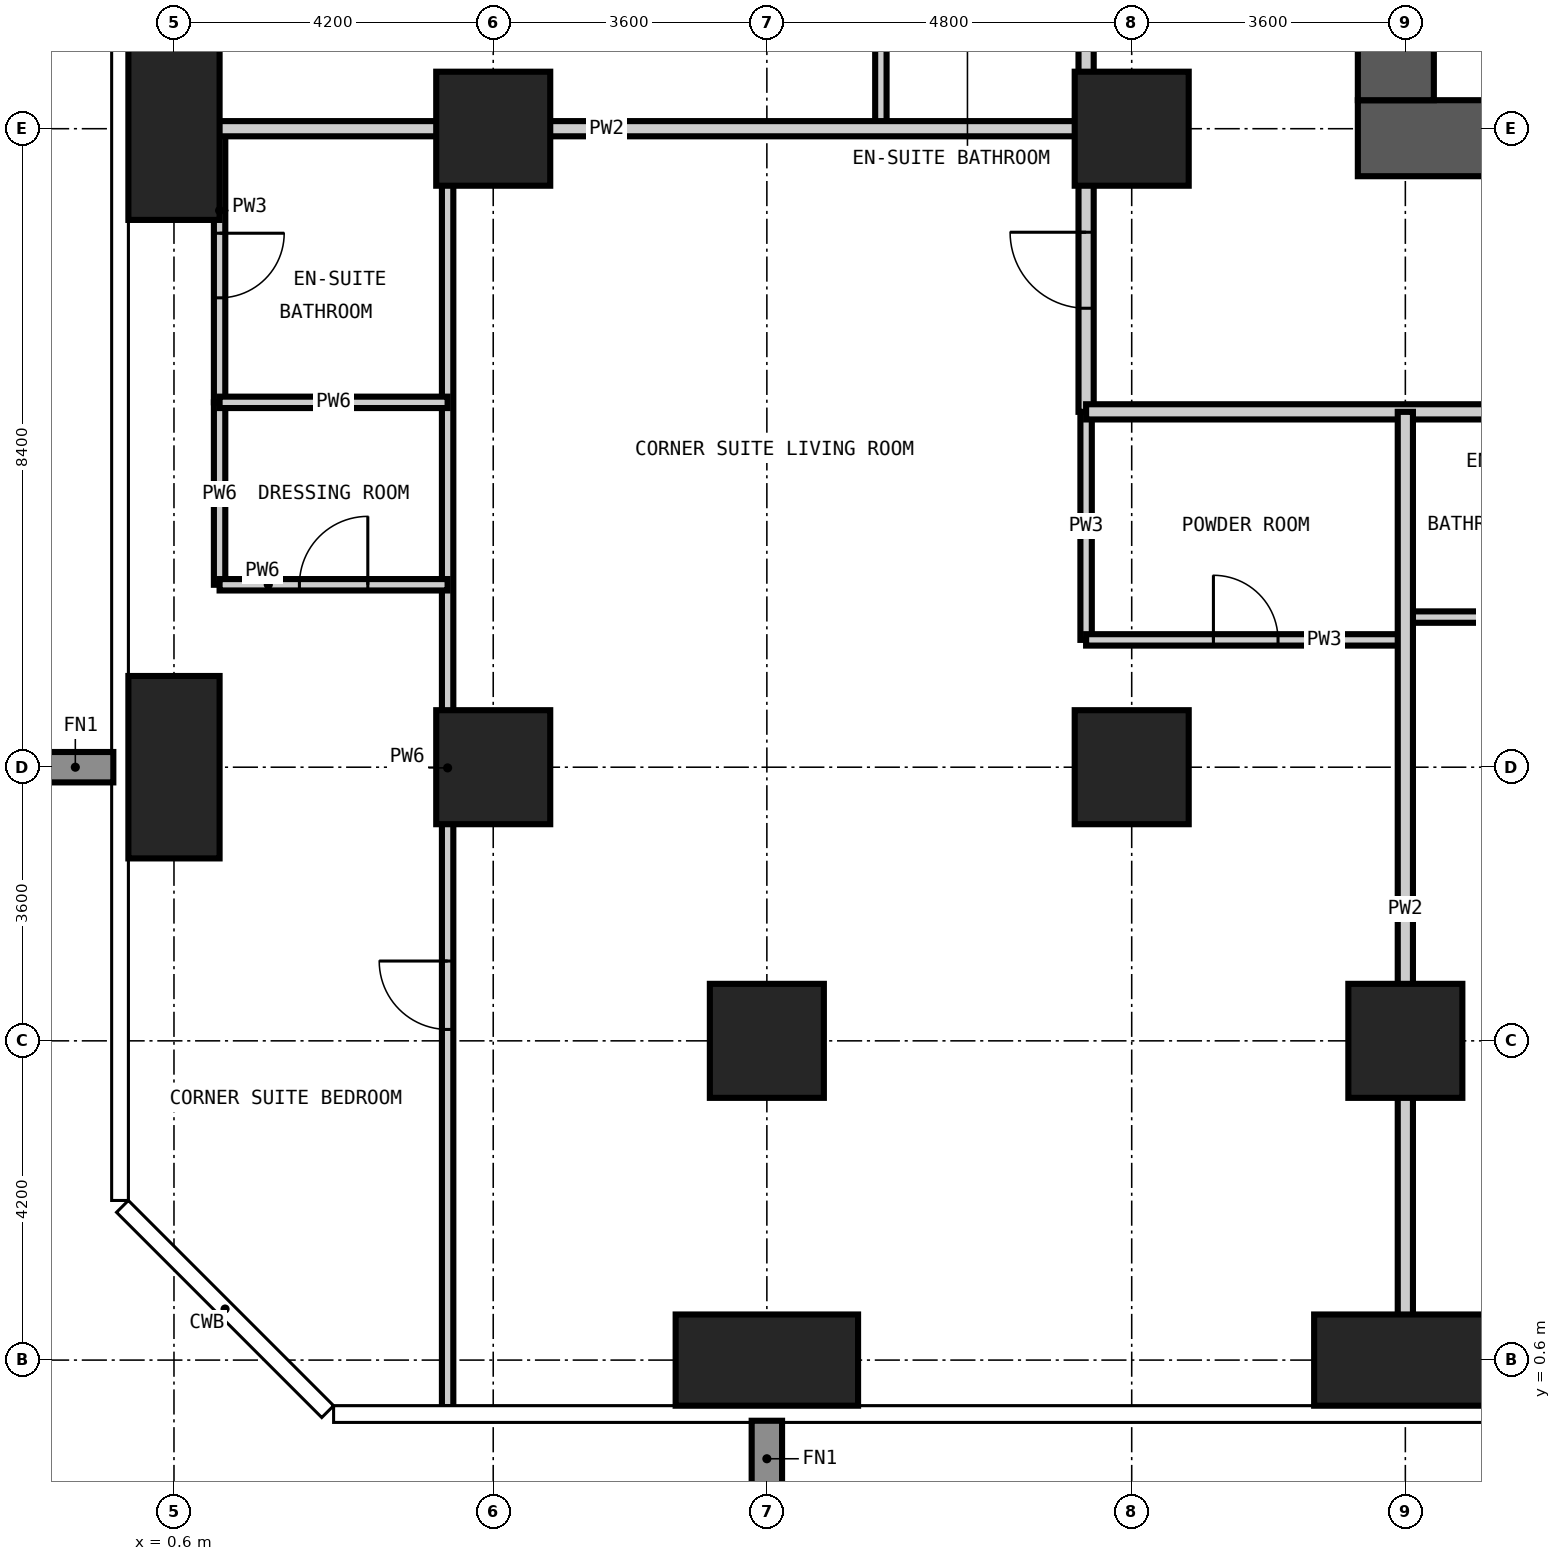
"""IFC4 building model, lengths in metres.
Left out: names, types, materials, properties, quantities, classifications, styles, units other than length and angle.
Written with IfcOpenShell. Run it as: python <this file> out.ifc"""

import sys

from ifc_helpers import new_model, si_unit, direction, frame, frame_2d, origin, origin_2d, place, context, subcontext, project, spatial, rectangle, extrude, element, fill, save


model = new_model("IFC4")
c1 = context("Model", 3, precision=1e-05, world=origin(), true_north=direction((0.0, 1.0)))
c2 = subcontext(c1, "Body", "Model", "MODEL_VIEW")
j1 = project(units=[si_unit("LENGTHUNIT", "METRE"), si_unit("PLANEANGLEUNIT", "RADIAN")], contexts=[c1])
p1 = place(None, origin())
s1 = spatial("IfcSite", under=j1, at=p1, CompositionType="ELEMENT")
p2 = place(p1, origin())
s2 = spatial("IfcBuilding", under=s1, at=p2, CompositionType="ELEMENT")
p3 = place(p2, frame((0.0, 0.0, 118.8)))
s3 = spatial("IfcBuildingStorey", under=s2, at=p3, CompositionType="ELEMENT", Elevation=118.8)
for number, where, z_axis, x_axis in (
    (1, (0.6, 8.4, -0.35), (0.0, 0.0, 1.0), (1.0, 0.0, 0.0)),
    (2, (0.6, 16.8, -0.35), (0.0, 0.0, 1.0), (1.0, 0.0, 0.0)),
):
    element("IfcColumn", number, at=place(p3, frame(where, z_axis=z_axis, x_axis=x_axis)), inside=s3, PredefinedType="COLUMN", context=c2, shape_type="SweptSolid", body=[
        extrude(rectangle(XDim=1.2, YDim=2.4, at=origin_2d()), origin(), (0.0, 0.0, 1.0), 3.6),
    ])
for number, where, z_axis, x_axis in (
    (3, (4.8, 8.4, -0.35), (0.0, 0.0, 1.0), (1.0, 0.0, 0.0)),
    (4, (4.8, 16.8, -0.35), (0.0, 0.0, 1.0), (1.0, 0.0, 0.0)),
):
    element("IfcColumn", number, at=place(p3, frame(where, z_axis=z_axis, x_axis=x_axis)), inside=s3, PredefinedType="COLUMN", context=c2, shape_type="SweptSolid", body=[
        extrude(rectangle(XDim=1.5, YDim=1.5, at=origin_2d()), origin(), (0.0, 0.0, 1.0), 3.6),
    ])
p4 = place(p3, frame((8.4, 0.6, -0.35), z_axis=(0.0, 0.0, 1.0), x_axis=(1.0, 0.0, 0.0)))
e5 = element("IfcColumn", 5, at=p4, inside=s3, PredefinedType="COLUMN", context=c2, shape_type="SweptSolid", body=[
    extrude(rectangle(XDim=2.4, YDim=1.2, at=origin_2d()), origin(), (0.0, 0.0, 1.0), 3.6),
])
for number, where, z_axis, x_axis in (
    (6, (8.4, 4.8, -0.35), (0.0, 0.0, 1.0), (1.0, 0.0, 0.0)),
    (7, (13.2, 8.4, -0.35), (0.0, 0.0, 1.0), (1.0, 0.0, 0.0)),
    (8, (13.2, 16.8, -0.35), (0.0, 0.0, 1.0), (1.0, 0.0, 0.0)),
):
    element("IfcColumn", number, at=place(p3, frame(where, z_axis=z_axis, x_axis=x_axis)), inside=s3, PredefinedType="COLUMN", context=c2, shape_type="SweptSolid", body=[
        extrude(rectangle(XDim=1.5, YDim=1.5, at=origin_2d()), origin(), (0.0, 0.0, 1.0), 3.6),
    ])
p5 = place(p3, frame((16.8, 0.6, -0.35), z_axis=(0.0, 0.0, 1.0), x_axis=(1.0, 0.0, 0.0)))
e9 = element("IfcColumn", 9, at=p5, inside=s3, PredefinedType="COLUMN", context=c2, shape_type="SweptSolid", body=[
    extrude(rectangle(XDim=2.4, YDim=1.2, at=origin_2d()), origin(), (0.0, 0.0, 1.0), 3.6),
])
p6 = place(p3, frame((16.8, 4.8, -0.35), z_axis=(0.0, 0.0, 1.0), x_axis=(1.0, 0.0, 0.0)))
e10 = element("IfcColumn", 10, at=p6, inside=s3, PredefinedType="COLUMN", context=c2, shape_type="SweptSolid", body=[
    extrude(rectangle(XDim=1.5, YDim=1.5, at=origin_2d()), origin(), (0.0, 0.0, 1.0), 3.6),
])
p7 = place(p3, frame((16.175, 16.675, -0.35), z_axis=(0.0, 0.0, 1.0), x_axis=(1.0, 0.0, 0.0)))
e11 = element("IfcWall", 11, at=p7, inside=s3, PredefinedType="SHEAR", context=c2, shape_type="SweptSolid", body=[
    extrude(rectangle(XDim=26.45, YDim=1.0, at=frame_2d((13.225, 0.0))), origin(), (0.0, 0.0, 1.0), 3.6),
])
p8 = place(p7, frame((12.725, 0.0, 0.35)))
e12 = element("IfcOpeningElement", 12, at=p8, cuts=e11, PredefinedType="OPENING", context=c2, shape_type="SweptSolid", body=[
    extrude(rectangle(XDim=1.0, YDim=2.1, at=frame_2d((0.5, 1.05))), frame((0.0, 0.51, 0.0), z_axis=(0.0, -1.0, 0.0), x_axis=(1.0, 0.0, 0.0)), (0.0, 0.0, 1.0), 1.02),
])
p9 = place(p7, frame((19.025, 0.0, 0.35)))
e13 = element("IfcOpeningElement", 13, at=p9, cuts=e11, PredefinedType="OPENING", context=c2, shape_type="SweptSolid", body=[
    extrude(rectangle(XDim=1.0, YDim=2.1, at=frame_2d((0.5, 1.05))), frame((0.0, 0.51, 0.0), z_axis=(0.0, -1.0, 0.0), x_axis=(1.0, 0.0, 0.0)), (0.0, 0.0, 1.0), 1.02),
])
p10 = place(p3, frame((16.675, 41.625, -0.35), z_axis=(0.0, 0.0, 1.0), x_axis=(0.0, -1.0, 0.0)))
e14 = element("IfcWall", 14, at=p10, inside=s3, PredefinedType="SHEAR", context=c2, shape_type="SweptSolid", body=[
    extrude(rectangle(XDim=24.45, YDim=1.0, at=frame_2d((12.225, 0.0))), origin(), (0.0, 0.0, 1.0), 3.6),
])
p11 = place(p10, frame((11.325, 0.0, 0.35)))
e15 = element("IfcOpeningElement", 15, at=p11, cuts=e14, PredefinedType="OPENING", context=c2, shape_type="SweptSolid", body=[
    extrude(rectangle(XDim=1.8, YDim=2.2, at=frame_2d((0.9, 1.1))), frame((0.0, 0.51, 0.0), z_axis=(0.0, -1.0, 0.0), x_axis=(1.0, 0.0, 0.0)), (0.0, 0.0, 1.0), 1.02),
])
p12 = place(p10, frame((20.125, 0.0, 0.35)))
e16 = element("IfcOpeningElement", 16, at=p12, cuts=e14, PredefinedType="OPENING", context=c2, shape_type="SweptSolid", body=[
    extrude(rectangle(XDim=1.0, YDim=2.1, at=frame_2d((0.5, 1.05))), frame((0.0, 0.51, 0.0), z_axis=(0.0, -1.0, 0.0), x_axis=(1.0, 0.0, 0.0)), (0.0, 0.0, 1.0), 1.02),
])
p13 = place(p10, frame((5.425, 0.0, 0.35)))
e17 = element("IfcOpeningElement", 17, at=p13, cuts=e14, PredefinedType="OPENING", context=c2, shape_type="SweptSolid", body=[
    extrude(rectangle(XDim=1.0, YDim=2.1, at=frame_2d((0.5, 1.05))), frame((0.0, 0.51, 0.0), z_axis=(0.0, -1.0, 0.0), x_axis=(1.0, 0.0, 0.0)), (0.0, 0.0, 1.0), 1.02),
])
p14 = place(p3, frame((1.2, 13.2, 0.0), z_axis=(0.0, 0.0, 1.0), x_axis=(0.0, 1.0, 0.0)))
e18 = element("IfcWall", 18, at=p14, inside=s3, PredefinedType="PARTITIONING", context=c2, shape_type="SweptSolid", body=[
    extrude(rectangle(XDim=3.6, YDim=0.15, at=frame_2d((1.8, 0.0))), origin(), (0.0, 0.0, 1.0), 3.25),
])
p15 = place(p14, frame((1.375, 0.0, 0.0)))
e19 = element("IfcOpeningElement", 19, at=p15, cuts=e18, PredefinedType="OPENING", context=c2, shape_type="SweptSolid", body=[
    extrude(rectangle(XDim=0.85, YDim=2.1, at=frame_2d((0.425, 1.05))), frame((0.0, 0.085, 0.0), z_axis=(0.0, -1.0, 0.0), x_axis=(1.0, 0.0, 0.0)), (0.0, 0.0, 1.0), 0.17),
])
p16 = place(p3, frame((9.9, 16.8, 0.0), z_axis=(0.0, 0.0, 1.0), x_axis=(0.0, 1.0, 0.0)))
e20 = element("IfcWall", 20, at=p16, inside=s3, PredefinedType="PARTITIONING", context=c2, shape_type="SweptSolid", body=[
    extrude(rectangle(XDim=2.4, YDim=0.15, at=frame_2d((1.2, 0.0))), origin(), (0.0, 0.0, 1.0), 3.25),
])
p17 = place(p3, frame((12.6, 10.075, 0.0), z_axis=(0.0, 0.0, 1.0), x_axis=(0.0, 1.0, 0.0)))
e21 = element("IfcWall", 21, at=p17, inside=s3, PredefinedType="PARTITIONING", context=c2, shape_type="SweptSolid", body=[
    extrude(rectangle(XDim=3.0, YDim=0.15, at=frame_2d((1.5, 0.0))), origin(), (0.0, 0.0, 1.0), 3.25),
])
p18 = place(p3, frame((12.6, 10.075, 0.0), z_axis=(0.0, 0.0, 1.0), x_axis=(1.0, 0.0, 0.0)))
e22 = element("IfcWall", 22, at=p18, inside=s3, PredefinedType="PARTITIONING", context=c2, shape_type="SweptSolid", body=[
    extrude(rectangle(XDim=4.2, YDim=0.15, at=frame_2d((2.1, 0.0))), origin(), (0.0, 0.0, 1.0), 3.25),
])
p19 = place(p18, frame((1.675, 0.0, 0.0)))
e23 = element("IfcOpeningElement", 23, at=p19, cuts=e22, PredefinedType="OPENING", context=c2, shape_type="SweptSolid", body=[
    extrude(rectangle(XDim=0.85, YDim=2.1, at=frame_2d((0.425, 1.05))), frame((0.0, 0.085, 0.0), z_axis=(0.0, -1.0, 0.0), x_axis=(1.0, 0.0, 0.0)), (0.0, 0.0, 1.0), 0.17),
])
p20 = place(p3, frame((16.8, 10.375, 0.0), z_axis=(0.0, 0.0, 1.0), x_axis=(1.0, 0.0, 0.0)))
e24 = element("IfcWall", 24, at=p20, inside=s3, PredefinedType="PARTITIONING", context=c2, shape_type="SweptSolid", body=[
    extrude(rectangle(XDim=2.4, YDim=0.15, at=frame_2d((1.2, 0.0))), origin(), (0.0, 0.0, 1.0), 3.25),
])
p21 = place(p3, frame((12.6, 13.075, 0.0), z_axis=(0.0, 0.0, 1.0), x_axis=(0.0, 1.0, 0.0)))
e25 = element("IfcWall", 25, at=p21, inside=s3, PredefinedType="PARTITIONING", context=c2, shape_type="SweptSolid", body=[
    extrude(rectangle(XDim=31.45, YDim=0.2, at=frame_2d((15.725, 0.0))), origin(), (0.0, 0.0, 1.0), 3.25),
])
p22 = place(p21, frame((8.625, 0.0, 0.0)))
e26 = element("IfcOpeningElement", 26, at=p22, cuts=e25, PredefinedType="OPENING", context=c2, shape_type="SweptSolid", body=[
    extrude(rectangle(XDim=1.0, YDim=2.2, at=frame_2d((0.5, 1.1))), frame((0.0, 0.11, 0.0), z_axis=(0.0, -1.0, 0.0), x_axis=(1.0, 0.0, 0.0)), (0.0, 0.0, 1.0), 0.22),
])
p23 = place(p21, frame((17.025, 0.0, 0.0)))
e27 = element("IfcOpeningElement", 27, at=p23, cuts=e25, PredefinedType="OPENING", context=c2, shape_type="SweptSolid", body=[
    extrude(rectangle(XDim=1.0, YDim=2.2, at=frame_2d((0.5, 1.1))), frame((0.0, 0.11, 0.0), z_axis=(0.0, -1.0, 0.0), x_axis=(1.0, 0.0, 0.0)), (0.0, 0.0, 1.0), 0.22),
])
p24 = place(p21, frame((25.425, 0.0, 0.0)))
e28 = element("IfcOpeningElement", 28, at=p24, cuts=e25, PredefinedType="OPENING", context=c2, shape_type="SweptSolid", body=[
    extrude(rectangle(XDim=1.0, YDim=2.2, at=frame_2d((0.5, 1.1))), frame((0.0, 0.11, 0.0), z_axis=(0.0, -1.0, 0.0), x_axis=(1.0, 0.0, 0.0)), (0.0, 0.0, 1.0), 0.22),
])
p25 = place(p21, frame((1.363, 0.0, 0.0)))
e29 = element("IfcOpeningElement", 29, at=p25, cuts=e25, PredefinedType="OPENING", context=c2, shape_type="SweptSolid", body=[
    extrude(rectangle(XDim=1.0, YDim=2.2, at=frame_2d((0.5, 1.1))), frame((0.0, 0.11, 0.0), z_axis=(0.0, -1.0, 0.0), x_axis=(1.0, 0.0, 0.0)), (0.0, 0.0, 1.0), 0.22),
])
p26 = place(p21, frame((29.788, 0.0, 0.0)))
e30 = element("IfcOpeningElement", 30, at=p26, cuts=e25, PredefinedType="OPENING", context=c2, shape_type="SweptSolid", body=[
    extrude(rectangle(XDim=1.0, YDim=2.2, at=frame_2d((0.5, 1.1))), frame((0.0, 0.11, 0.0), z_axis=(0.0, -1.0, 0.0), x_axis=(1.0, 0.0, 0.0)), (0.0, 0.0, 1.0), 0.22),
])
p27 = place(p3, frame((45.125, 13.075, 0.0), z_axis=(0.0, 0.0, 1.0), x_axis=(-1.0, 0.0, 0.0)))
e31 = element("IfcWall", 31, at=p27, inside=s3, PredefinedType="PARTITIONING", context=c2, shape_type="SweptSolid", body=[
    extrude(rectangle(XDim=32.525, YDim=0.2, at=frame_2d((16.262, 0.0))), origin(), (0.0, 0.0, 1.0), 3.25),
])
p28 = place(p27, frame((22.425, 0.0, 0.0)))
e32 = element("IfcOpeningElement", 32, at=p28, cuts=e31, PredefinedType="OPENING", context=c2, shape_type="SweptSolid", body=[
    extrude(rectangle(XDim=1.0, YDim=2.2, at=frame_2d((0.5, 1.1))), frame((0.0, 0.11, 0.0), z_axis=(0.0, -1.0, 0.0), x_axis=(1.0, 0.0, 0.0)), (0.0, 0.0, 1.0), 0.22),
])
p29 = place(p27, frame((14.025, 0.0, 0.0)))
e33 = element("IfcOpeningElement", 33, at=p29, cuts=e31, PredefinedType="OPENING", context=c2, shape_type="SweptSolid", body=[
    extrude(rectangle(XDim=1.0, YDim=2.2, at=frame_2d((0.5, 1.1))), frame((0.0, 0.11, 0.0), z_axis=(0.0, -1.0, 0.0), x_axis=(1.0, 0.0, 0.0)), (0.0, 0.0, 1.0), 0.22),
])
p30 = place(p27, frame((5.625, 0.0, 0.0)))
e34 = element("IfcOpeningElement", 34, at=p30, cuts=e31, PredefinedType="OPENING", context=c2, shape_type="SweptSolid", body=[
    extrude(rectangle(XDim=1.0, YDim=2.2, at=frame_2d((0.5, 1.1))), frame((0.0, 0.11, 0.0), z_axis=(0.0, -1.0, 0.0), x_axis=(1.0, 0.0, 0.0)), (0.0, 0.0, 1.0), 0.22),
])
p31 = place(p3, frame((16.8, -0.018, 0.0), z_axis=(0.0, 0.0, 1.0), x_axis=(0.0, 1.0, 0.0)))
e35 = element("IfcWall", 35, at=p31, inside=s3, PredefinedType="PARTITIONING", context=c2, shape_type="SweptSolid", body=[
    extrude(rectangle(XDim=13.093, YDim=0.2, at=frame_2d((6.546, 0.0))), origin(), (0.0, 0.0, 1.0), 3.25),
])
p32 = place(p3, frame((-0.018, 16.8, 0.0), z_axis=(0.0, 0.0, 1.0), x_axis=(1.0, 0.0, 0.0)))
e36 = element("IfcWall", 36, at=p32, inside=s3, PredefinedType="PARTITIONING", context=c2, shape_type="SweptSolid", body=[
    extrude(rectangle(XDim=12.618, YDim=0.2, at=frame_2d((6.309, 0.0))), origin(), (0.0, 0.0, 1.0), 3.25),
])
p33 = place(p3, frame((1.2, 10.8, 0.0), z_axis=(0.0, 0.0, 1.0), x_axis=(0.0, 1.0, 0.0)))
e37 = element("IfcWall", 37, at=p33, inside=s3, PredefinedType="PARTITIONING", context=c2, shape_type="SweptSolid", body=[
    extrude(rectangle(XDim=2.4, YDim=0.15, at=frame_2d((1.2, 0.0))), origin(), (0.0, 0.0, 1.0), 3.25),
])
p34 = place(p3, frame((4.2, -0.018, 0.0), z_axis=(0.0, 0.0, 1.0), x_axis=(0.0, 1.0, 0.0)))
e38 = element("IfcWall", 38, at=p34, inside=s3, PredefinedType="PARTITIONING", context=c2, shape_type="SweptSolid", body=[
    extrude(rectangle(XDim=16.818, YDim=0.15, at=frame_2d((8.409, 0.0))), origin(), (0.0, 0.0, 1.0), 3.25),
])
p35 = place(p34, frame((4.968, 0.0, 0.0)))
e39 = element("IfcOpeningElement", 39, at=p35, cuts=e38, PredefinedType="OPENING", context=c2, shape_type="SweptSolid", body=[
    extrude(rectangle(XDim=0.9, YDim=2.1, at=frame_2d((0.45, 1.05))), frame((0.0, 0.085, 0.0), z_axis=(0.0, -1.0, 0.0), x_axis=(1.0, 0.0, 0.0)), (0.0, 0.0, 1.0), 0.17),
])
p36 = place(p3, frame((1.2, 10.8, 0.0), z_axis=(0.0, 0.0, 1.0), x_axis=(1.0, 0.0, 0.0)))
e40 = element("IfcWall", 40, at=p36, inside=s3, PredefinedType="PARTITIONING", context=c2, shape_type="SweptSolid", body=[
    extrude(rectangle(XDim=3.0, YDim=0.15, at=frame_2d((1.5, 0.0))), origin(), (0.0, 0.0, 1.0), 3.25),
])
p37 = place(p36, frame((1.05, 0.0, 0.0)))
e41 = element("IfcOpeningElement", 41, at=p37, cuts=e40, PredefinedType="OPENING", context=c2, shape_type="SweptSolid", body=[
    extrude(rectangle(XDim=0.9, YDim=2.1, at=frame_2d((0.45, 1.05))), frame((0.0, 0.085, 0.0), z_axis=(0.0, -1.0, 0.0), x_axis=(1.0, 0.0, 0.0)), (0.0, 0.0, 1.0), 0.17),
])
p38 = place(p3, frame((1.2, 13.2, 0.0), z_axis=(0.0, 0.0, 1.0), x_axis=(1.0, 0.0, 0.0)))
e42 = element("IfcWall", 42, at=p38, inside=s3, PredefinedType="PARTITIONING", context=c2, shape_type="SweptSolid", body=[
    extrude(rectangle(XDim=3.0, YDim=0.15, at=frame_2d((1.5, 0.0))), origin(), (0.0, 0.0, 1.0), 3.25),
])
p39 = place(p25, origin())
e43 = element("IfcDoor", 43, at=p39, inside=s3, OperationType="SINGLE_SWING_RIGHT", PredefinedType="DOOR", context=c2, shape_type="SweptSolid", body=[
    extrude(rectangle(XDim=1.0, YDim=2.2, at=frame_2d((0.5, 1.1))), frame((0.0, 0.025, 0.0), z_axis=(0.0, -1.0, 0.0), x_axis=(1.0, 0.0, 0.0)), (0.0, 0.0, 1.0), 0.05),
])
fill(e29, e43)
p40 = place(p19, origin())
e44 = element("IfcDoor", 44, at=p40, inside=s3, OperationType="SINGLE_SWING_LEFT", PredefinedType="DOOR", context=c2, shape_type="SweptSolid", body=[
    extrude(rectangle(XDim=0.85, YDim=2.1, at=frame_2d((0.425, 1.05))), frame((0.0, 0.025, 0.0), z_axis=(0.0, -1.0, 0.0), x_axis=(1.0, 0.0, 0.0)), (0.0, 0.0, 1.0), 0.05),
])
fill(e23, e44)
p41 = place(p35, origin())
e45 = element("IfcDoor", 45, at=p41, inside=s3, OperationType="SINGLE_SWING_RIGHT", PredefinedType="DOOR", context=c2, shape_type="SweptSolid", body=[
    extrude(rectangle(XDim=0.9, YDim=2.1, at=frame_2d((0.45, 1.05))), frame((0.0, 0.025, 0.0), z_axis=(0.0, -1.0, 0.0), x_axis=(1.0, 0.0, 0.0)), (0.0, 0.0, 1.0), 0.05),
])
fill(e39, e45)
p42 = place(p15, frame((0.85, 0.0, 0.0), z_axis=(0.0, 0.0, 1.0), x_axis=(-1.0, 0.0, 0.0)))
e46 = element("IfcDoor", 46, at=p42, inside=s3, OperationType="SINGLE_SWING_LEFT", PredefinedType="DOOR", context=c2, shape_type="SweptSolid", body=[
    extrude(rectangle(XDim=0.85, YDim=2.1, at=frame_2d((0.425, 1.05))), frame((0.0, 0.025, 0.0), z_axis=(0.0, -1.0, 0.0), x_axis=(1.0, 0.0, 0.0)), (0.0, 0.0, 1.0), 0.05),
])
fill(e19, e46)
p43 = place(p37, origin())
e47 = element("IfcDoor", 47, at=p43, inside=s3, OperationType="SINGLE_SWING_RIGHT", PredefinedType="DOOR", context=c2, shape_type="SweptSolid", body=[
    extrude(rectangle(XDim=0.9, YDim=2.1, at=frame_2d((0.45, 1.05))), frame((0.0, 0.025, 0.0), z_axis=(0.0, -1.0, 0.0), x_axis=(1.0, 0.0, 0.0)), (0.0, 0.0, 1.0), 0.05),
])
fill(e41, e47)
save(model, sys.argv[1])
